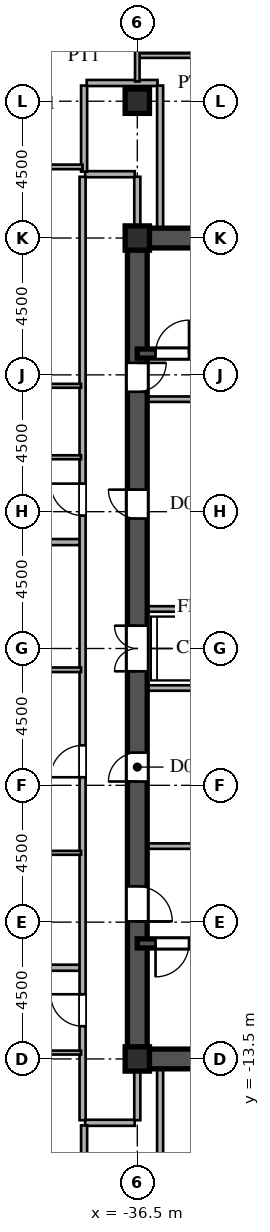
"""IFC4 building model, lengths in metres.
Left out: names, types, materials, properties, quantities, classifications, styles, units other than length and angle.
Written with IfcOpenShell. Run it as: python <this file> out.ifc"""

import sys

from ifc_helpers import new_model, si_unit, direction, frame, frame_2d, origin, origin_2d, place, context, subcontext, project, spatial, rectangle, i_section, extrude, source, transform, mapped, element, fill, save


model = new_model("IFC4")
c1 = context("Model", 3, precision=1e-05, world=origin(), true_north=direction((0.0, 1.0)))
c2 = subcontext(c1, "Body", "Model", "MODEL_VIEW")
j1 = project(units=[si_unit("LENGTHUNIT", "METRE"), si_unit("PLANEANGLEUNIT", "RADIAN")], contexts=[c1])
p1 = place(None, origin())
s1 = spatial("IfcSite", under=j1, at=p1, CompositionType="ELEMENT")
p2 = place(p1, origin())
s2 = spatial("IfcBuilding", under=s1, at=p2, CompositionType="ELEMENT")
p3 = place(p2, frame((0.0, 0.0, 106.8)))
s3 = spatial("IfcBuildingStorey", under=s2, at=p3, CompositionType="ELEMENT", Elevation=106.8)
m1 = source(origin(), c2, "Body", "SweptSolid", [
    extrude(i_section(OverallWidth=0.8, OverallDepth=0.8, WebThickness=0.032, FlangeThickness=0.05, at=origin_2d()), origin(), (0.0, 0.0, 1.0), 3.6),
])
for number, where, z_axis, x_axis in (
    (1, (-36.5, -13.5, 0.0), (0.0, 0.0, 1.0), (1.0, 0.0, 0.0)),
    (2, (-36.5, 13.5, 0.0), (0.0, 0.0, 1.0), (1.0, 0.0, 0.0)),
    (3, (-36.5, 18.0, 0.0), (0.0, 0.0, 1.0), (1.0, 0.0, 0.0)),
):
    element("IfcColumn", number, at=place(p3, frame(where, z_axis=z_axis, x_axis=x_axis)), inside=s3, PredefinedType="COLUMN", context=c2, shape_type="MappedRepresentation", body=[
        mapped(m1, transform((0.0, 0.0, 0.0), scale=1.0)),
    ])
for number, where, z_axis, x_axis in (
    (4, (-36.5, -13.5, 0.0), (0.0, 0.0, 1.0), (1.0, 0.0, 0.0)),
    (5, (-36.5, 13.5, 0.0), (0.0, 0.0, 1.0), (1.0, 0.0, 0.0)),
):
    element("IfcWall", number, at=place(p3, frame(where, z_axis=z_axis, x_axis=x_axis)), inside=s3, PredefinedType="SHEAR", context=c2, shape_type="SweptSolid", body=[
        extrude(rectangle(XDim=9.0, YDim=0.65, at=frame_2d((4.5, 0.0))), origin(), (0.0, 0.0, 1.0), 3.38),
    ])
p4 = place(p3, frame((-36.5, -13.65, 0.0), z_axis=(0.0, 0.0, 1.0), x_axis=(0.0, 1.0, 0.0)))
e6 = element("IfcWall", 6, at=p4, inside=s3, PredefinedType="SHEAR", context=c2, shape_type="SweptSolid", body=[
    extrude(rectangle(XDim=7.15, YDim=0.65, at=frame_2d((3.575, 0.0))), origin(), (0.0, 0.0, 1.0), 3.38),
])
p5 = place(p4, frame((4.675, 0.0, 0.0)))
e7 = element("IfcOpeningElement", 7, at=p5, cuts=e6, PredefinedType="OPENING", context=c2, shape_type="SweptSolid", body=[
    extrude(rectangle(XDim=1.15, YDim=2.2, at=frame_2d((0.575, 1.1))), frame((0.0, 0.335, 0.0), z_axis=(0.0, -1.0, 0.0), x_axis=(1.0, 0.0, 0.0)), (0.0, 0.0, 1.0), 0.67),
])
p6 = place(p3, frame((-36.5, -1.3, 0.0), z_axis=(0.0, 0.0, 1.0), x_axis=(0.0, 1.0, 0.0)))
e8 = element("IfcWall", 8, at=p6, inside=s3, PredefinedType="SHEAR", context=c2, shape_type="SweptSolid", body=[
    extrude(rectangle(XDim=2.6, YDim=0.65, at=frame_2d((1.3, 0.0))), origin(), (0.0, 0.0, 1.0), 3.38),
])
p7 = place(p6, frame((0.55, 0.0, 0.0)))
e9 = element("IfcOpeningElement", 9, at=p7, cuts=e8, PredefinedType="OPENING", context=c2, shape_type="SweptSolid", body=[
    extrude(rectangle(XDim=1.5, YDim=2.3, at=frame_2d((0.75, 1.15))), frame((0.0, 0.335, 0.0), z_axis=(0.0, -1.0, 0.0), x_axis=(1.0, 0.0, 0.0)), (0.0, 0.0, 1.0), 0.67),
])
p8 = place(p3, frame((-36.5, 8.2, 0.0), z_axis=(0.0, 0.0, 1.0), x_axis=(0.0, 1.0, 0.0)))
e10 = element("IfcWall", 10, at=p8, inside=s3, PredefinedType="SHEAR", context=c2, shape_type="SweptSolid", body=[
    extrude(rectangle(XDim=5.45, YDim=0.65, at=frame_2d((2.725, 0.0))), origin(), (0.0, 0.0, 1.0), 3.38),
])
p9 = place(p8, frame((0.245, 0.0, 0.0)))
e11 = element("IfcOpeningElement", 11, at=p9, cuts=e10, PredefinedType="OPENING", context=c2, shape_type="SweptSolid", body=[
    extrude(rectangle(XDim=0.95, YDim=2.15, at=frame_2d((0.475, 1.075))), frame((0.0, 0.335, 0.0), z_axis=(0.0, -1.0, 0.0), x_axis=(1.0, 0.0, 0.0)), (0.0, 0.0, 1.0), 0.67),
])
p10 = place(p3, frame((-36.5, -6.5, 0.0), z_axis=(0.0, 0.0, 1.0), x_axis=(0.0, 1.0, 0.0)))
e12 = element("IfcWall", 12, at=p10, inside=s3, PredefinedType="SHEAR", context=c2, shape_type="SweptSolid", body=[
    extrude(rectangle(XDim=5.2, YDim=0.65, at=frame_2d((2.6, 0.0))), origin(), (0.0, 0.0, 1.0), 3.38),
])
p11 = place(p10, frame((2.125, 0.0, 0.0)))
e13 = element("IfcOpeningElement", 13, at=p11, cuts=e12, PredefinedType="OPENING", context=c2, shape_type="SweptSolid", body=[
    extrude(rectangle(XDim=0.95, YDim=2.15, at=frame_2d((0.475, 1.075))), frame((0.0, 0.335, 0.0), z_axis=(0.0, -1.0, 0.0), x_axis=(1.0, 0.0, 0.0)), (0.0, 0.0, 1.0), 0.67),
])
p12 = place(p3, frame((-36.5, 1.3, 0.0), z_axis=(0.0, 0.0, 1.0), x_axis=(0.0, 1.0, 0.0)))
e14 = element("IfcWall", 14, at=p12, inside=s3, PredefinedType="SHEAR", context=c2, shape_type="SweptSolid", body=[
    extrude(rectangle(XDim=6.9, YDim=0.65, at=frame_2d((3.45, 0.0))), origin(), (0.0, 0.0, 1.0), 3.38),
])
p13 = place(p12, frame((2.975, 0.0, 0.0)))
e15 = element("IfcOpeningElement", 15, at=p13, cuts=e14, PredefinedType="OPENING", context=c2, shape_type="SweptSolid", body=[
    extrude(rectangle(XDim=0.95, YDim=2.15, at=frame_2d((0.475, 1.075))), frame((0.0, 0.335, 0.0), z_axis=(0.0, -1.0, 0.0), x_axis=(1.0, 0.0, 0.0)), (0.0, 0.0, 1.0), 0.67),
])
p14 = place(p3, frame((-36.5, -9.7, 0.0), z_axis=(0.0, 0.0, 1.0), x_axis=(1.0, 0.0, 0.0)))
e16 = element("IfcWall", 16, at=p14, inside=s3, PredefinedType="SHEAR", context=c2, shape_type="SweptSolid", body=[
    extrude(rectangle(XDim=9.0, YDim=0.3, at=frame_2d((4.5, 0.0))), origin(), (0.0, 0.0, 1.0), 3.38),
])
p15 = place(p14, frame((0.6, 0.0, 0.0)))
e17 = element("IfcOpeningElement", 17, at=p15, cuts=e16, PredefinedType="OPENING", context=c2, shape_type="SweptSolid", body=[
    extrude(rectangle(XDim=1.1, YDim=2.2, at=frame_2d((0.55, 1.1))), frame((0.0, 0.16, 0.0), z_axis=(0.0, -1.0, 0.0), x_axis=(1.0, 0.0, 0.0)), (0.0, 0.0, 1.0), 0.32),
])
p16 = place(p3, frame((-36.5, 9.7, 0.0), z_axis=(0.0, 0.0, 1.0), x_axis=(1.0, 0.0, 0.0)))
e18 = element("IfcWall", 18, at=p16, inside=s3, PredefinedType="SHEAR", context=c2, shape_type="SweptSolid", body=[
    extrude(rectangle(XDim=9.0, YDim=0.3, at=frame_2d((4.5, 0.0))), origin(), (0.0, 0.0, 1.0), 3.38),
])
p17 = place(p16, frame((0.6, 0.0, 0.0)))
e19 = element("IfcOpeningElement", 19, at=p17, cuts=e18, PredefinedType="OPENING", context=c2, shape_type="SweptSolid", body=[
    extrude(rectangle(XDim=1.1, YDim=2.2, at=frame_2d((0.55, 1.1))), frame((0.0, 0.16, 0.0), z_axis=(0.0, -1.0, 0.0), x_axis=(1.0, 0.0, 0.0)), (0.0, 0.0, 1.0), 0.32),
])
for number, where, z_axis, x_axis in (
    (20, (-36.15, -6.5, 0.0), (0.0, 0.0, 1.0), (1.0, 0.0, 0.0)),
    (21, (-36.15, 8.2, 0.0), (0.0, 0.0, 1.0), (1.0, 0.0, 0.0)),
):
    element("IfcWall", number, at=place(p3, frame(where, z_axis=z_axis, x_axis=x_axis)), inside=s3, PredefinedType="PARTITIONING", context=c2, shape_type="SweptSolid", body=[
        extrude(rectangle(XDim=5.7, YDim=0.18, at=frame_2d((2.85, 0.0))), origin(), (0.0, 0.0, 1.0), 3.38),
    ])
for number, where, z_axis, x_axis in (
    (22, (-36.15, -1.3, 0.0), (0.0, 0.0, 1.0), (1.0, 0.0, 0.0)),
    (23, (-36.15, 1.3, 0.0), (0.0, 0.0, 1.0), (1.0, 0.0, 0.0)),
):
    element("IfcWall", number, at=place(p3, frame(where, z_axis=z_axis, x_axis=x_axis)), inside=s3, PredefinedType="PARTITIONING", context=c2, shape_type="SweptSolid", body=[
        extrude(rectangle(XDim=2.95, YDim=0.18, at=frame_2d((1.475, 0.0))), origin(), (0.0, 0.0, 1.0), 3.38),
    ])
p18 = place(p3, frame((-38.215, -15.6, 0.0), z_axis=(0.0, 0.0, 1.0), x_axis=(1.0, 0.0, 0.0)))
e24 = element("IfcWall", 24, at=p18, inside=s3, PredefinedType="PARTITIONING", context=c2, shape_type="SweptSolid", body=[
    extrude(rectangle(XDim=1.63, YDim=0.2, at=frame_2d((0.815, 0.0))), origin(), (0.0, 0.0, 1.0), 3.38),
])
p19 = place(p3, frame((-42.5, -13.29, 0.0), z_axis=(0.0, 0.0, 1.0), x_axis=(1.0, 0.0, 0.0)))
e25 = element("IfcWall", 25, at=p19, inside=s3, PredefinedType="PARTITIONING", context=c2, shape_type="SweptSolid", body=[
    extrude(rectangle(XDim=4.15, YDim=0.13, at=frame_2d((2.075, 0.0))), origin(), (0.0, 0.0, 1.0), 3.38),
])
p20 = place(p19, frame((1.635, 0.0, 0.0)))
e26 = element("IfcOpeningElement", 26, at=p20, cuts=e25, PredefinedType="OPENING", context=c2, shape_type="SweptSolid", body=[
    extrude(rectangle(XDim=0.88, YDim=2.1, at=frame_2d((0.44, 1.05))), frame((0.0, 0.075, 0.0), z_axis=(0.0, -1.0, 0.0), x_axis=(1.0, 0.0, 0.0)), (0.0, 0.0, 1.0), 0.15),
])
p21 = place(p3, frame((-64.346, -10.5, 0.0), z_axis=(0.0, 0.0, 1.0), x_axis=(1.0, 0.0, 0.0)))
e27 = element("IfcWall", 27, at=p21, inside=s3, PredefinedType="PARTITIONING", context=c2, shape_type="SweptSolid", body=[
    extrude(rectangle(XDim=25.966, YDim=0.2, at=frame_2d((12.983, 0.0))), origin(), (0.0, 0.0, 1.0), 3.38),
])
p22 = place(p3, frame((-42.5, -6.72, 0.0), z_axis=(0.0, 0.0, 1.0), x_axis=(1.0, 0.0, 0.0)))
e28 = element("IfcWall", 28, at=p22, inside=s3, PredefinedType="PARTITIONING", context=c2, shape_type="SweptSolid", body=[
    extrude(rectangle(XDim=4.15, YDim=0.13, at=frame_2d((2.075, 0.0))), origin(), (0.0, 0.0, 1.0), 3.38),
])
p23 = place(p22, frame((1.635, 0.0, 0.0)))
e29 = element("IfcOpeningElement", 29, at=p23, cuts=e28, PredefinedType="OPENING", context=c2, shape_type="SweptSolid", body=[
    extrude(rectangle(XDim=0.88, YDim=2.1, at=frame_2d((0.44, 1.05))), frame((0.0, 0.075, 0.0), z_axis=(0.0, -1.0, 0.0), x_axis=(1.0, 0.0, 0.0)), (0.0, 0.0, 1.0), 0.15),
])
p24 = place(p3, frame((-42.5, -0.7, 0.0), z_axis=(0.0, 0.0, 1.0), x_axis=(1.0, 0.0, 0.0)))
e30 = element("IfcWall", 30, at=p24, inside=s3, PredefinedType="PARTITIONING", context=c2, shape_type="SweptSolid", body=[
    extrude(rectangle(XDim=4.15, YDim=0.15, at=frame_2d((2.075, 0.0))), origin(), (0.0, 0.0, 1.0), 3.38),
])
p25 = place(p24, frame((1.6, 0.0, 0.0)))
e31 = element("IfcOpeningElement", 31, at=p25, cuts=e30, PredefinedType="OPENING", context=c2, shape_type="SweptSolid", body=[
    extrude(rectangle(XDim=0.95, YDim=2.15, at=frame_2d((0.475, 1.075))), frame((0.0, 0.085, 0.0), z_axis=(0.0, -1.0, 0.0), x_axis=(1.0, 0.0, 0.0)), (0.0, 0.0, 1.0), 0.17),
])
p26 = place(p3, frame((-71.005, 3.5, 0.0), z_axis=(0.0, 0.0, 1.0), x_axis=(1.0, 0.0, 0.0)))
e32 = element("IfcWall", 32, at=p26, inside=s3, PredefinedType="PARTITIONING", context=c2, shape_type="SweptSolid", body=[
    extrude(rectangle(XDim=32.625, YDim=0.2, at=frame_2d((16.312, 0.0))), origin(), (0.0, 0.0, 1.0), 3.38),
])
p27 = place(p3, frame((-42.5, 6.29, 0.0), z_axis=(0.0, 0.0, 1.0), x_axis=(1.0, 0.0, 0.0)))
e33 = element("IfcWall", 33, at=p27, inside=s3, PredefinedType="PARTITIONING", context=c2, shape_type="SweptSolid", body=[
    extrude(rectangle(XDim=4.15, YDim=0.13, at=frame_2d((2.075, 0.0))), origin(), (0.0, 0.0, 1.0), 3.38),
])
p28 = place(p27, frame((1.635, 0.0, 0.0)))
e34 = element("IfcOpeningElement", 34, at=p28, cuts=e33, PredefinedType="OPENING", context=c2, shape_type="SweptSolid", body=[
    extrude(rectangle(XDim=0.88, YDim=2.1, at=frame_2d((0.44, 1.05))), frame((0.0, 0.075, 0.0), z_axis=(0.0, -1.0, 0.0), x_axis=(1.0, 0.0, 0.0)), (0.0, 0.0, 1.0), 0.15),
])
p29 = place(p3, frame((-42.5, 8.64, 0.0), z_axis=(0.0, 0.0, 1.0), x_axis=(1.0, 0.0, 0.0)))
e35 = element("IfcWall", 35, at=p29, inside=s3, PredefinedType="PARTITIONING", context=c2, shape_type="SweptSolid", body=[
    extrude(rectangle(XDim=4.15, YDim=0.13, at=frame_2d((2.075, 0.0))), origin(), (0.0, 0.0, 1.0), 3.38),
])
p30 = place(p3, frame((-38.215, 15.6, 0.0), z_axis=(0.0, 0.0, 1.0), x_axis=(1.0, 0.0, 0.0)))
e36 = element("IfcWall", 36, at=p30, inside=s3, PredefinedType="PARTITIONING", context=c2, shape_type="SweptSolid", body=[
    extrude(rectangle(XDim=1.63, YDim=0.2, at=frame_2d((0.815, 0.0))), origin(), (0.0, 0.0, 1.0), 3.38),
])
p31 = place(p3, frame((-42.5, 15.84, 0.0), z_axis=(0.0, 0.0, 1.0), x_axis=(1.0, 0.0, 0.0)))
e37 = element("IfcWall", 37, at=p31, inside=s3, PredefinedType="PARTITIONING", context=c2, shape_type="SweptSolid", body=[
    extrude(rectangle(XDim=4.2, YDim=0.15, at=frame_2d((2.1, 0.0))), origin(), (0.0, 0.0, 1.0), 3.38),
])
p32 = place(p3, frame((-38.165, 18.6, 0.0), z_axis=(0.0, 0.0, 1.0), x_axis=(1.0, 0.0, 0.0)))
e38 = element("IfcWall", 38, at=p32, inside=s3, PredefinedType="PARTITIONING", context=c2, shape_type="SweptSolid", body=[
    extrude(rectangle(XDim=0.753, YDim=0.2, at=frame_2d((0.376, 0.0))), origin(), (0.0, 0.0, 1.0), 2.08),
])
p33 = place(p3, frame((-37.412, 18.6, 0.0), z_axis=(0.0, 0.0, 1.0), x_axis=(1.0, 0.0, 0.0)))
e39 = element("IfcWall", 39, at=p33, inside=s3, PredefinedType="PARTITIONING", context=c2, shape_type="SweptSolid", body=[
    extrude(rectangle(XDim=1.577, YDim=0.2, at=frame_2d((0.789, 0.0))), origin(), (0.0, 0.0, 1.0), 3.38),
])
p34 = place(p3, frame((-36.45, 19.5, 0.0), z_axis=(0.0, 0.0, 1.0), x_axis=(1.0, 0.0, 0.0)))
e40 = element("IfcWall", 40, at=p34, inside=s3, PredefinedType="PARTITIONING", context=c2, shape_type="SweptSolid", body=[
    extrude(rectangle(XDim=8.985, YDim=0.15, at=frame_2d((4.492, 0.0))), origin(), (0.0, 0.0, 1.0), 3.38),
])
p35 = place(p34, frame((3.975, 0.0, 0.0)))
e41 = element("IfcOpeningElement", 41, at=p35, cuts=e40, PredefinedType="OPENING", context=c2, shape_type="SweptSolid", body=[
    extrude(rectangle(XDim=0.95, YDim=2.15, at=frame_2d((0.475, 1.075))), frame((0.0, 0.085, 0.0), z_axis=(0.0, -1.0, 0.0), x_axis=(1.0, 0.0, 0.0)), (0.0, 0.0, 1.0), 0.17),
])
p36 = place(p3, frame((-38.3, -15.515, 0.0), z_axis=(0.0, 0.0, 1.0), x_axis=(0.0, 1.0, 0.0)))
e42 = element("IfcWall", 42, at=p36, inside=s3, PredefinedType="PARTITIONING", context=c2, shape_type="SweptSolid", body=[
    extrude(rectangle(XDim=31.03, YDim=0.2, at=frame_2d((15.515, 0.0))), origin(), (0.0, 0.0, 1.0), 3.38),
])
p37 = place(p36, frame((3.093, 0.0, 0.0)))
e43 = element("IfcOpeningElement", 43, at=p37, cuts=e42, PredefinedType="OPENING", context=c2, shape_type="SweptSolid", body=[
    extrude(rectangle(XDim=1.05, YDim=2.25, at=frame_2d((0.525, 1.125))), frame((0.0, 0.11, 0.0), z_axis=(0.0, -1.0, 0.0), x_axis=(1.0, 0.0, 0.0)), (0.0, 0.0, 1.0), 0.22),
])
p38 = place(p36, frame((11.28, 0.0, 0.0)))
e44 = element("IfcOpeningElement", 44, at=p38, cuts=e42, PredefinedType="OPENING", context=c2, shape_type="SweptSolid", body=[
    extrude(rectangle(XDim=1.05, YDim=2.25, at=frame_2d((0.525, 1.125))), frame((0.0, 0.11, 0.0), z_axis=(0.0, -1.0, 0.0), x_axis=(1.0, 0.0, 0.0)), (0.0, 0.0, 1.0), 0.22),
])
p39 = place(p36, frame((19.887, 0.0, 0.0)))
e45 = element("IfcOpeningElement", 45, at=p39, cuts=e42, PredefinedType="OPENING", context=c2, shape_type="SweptSolid", body=[
    extrude(rectangle(XDim=1.05, YDim=2.25, at=frame_2d((0.525, 1.125))), frame((0.0, 0.11, 0.0), z_axis=(0.0, -1.0, 0.0), x_axis=(1.0, 0.0, 0.0)), (0.0, 0.0, 1.0), 0.22),
])
for number, where, z_axis, x_axis in (
    (46, (-38.25, -18.515, 0.0), (0.0, 0.0, 1.0), (0.0, 1.0, 0.0)),
    (47, (-38.25, 15.685, 0.0), (0.0, 0.0, 1.0), (0.0, 1.0, 0.0)),
):
    element("IfcWall", number, at=place(p3, frame(where, z_axis=z_axis, x_axis=x_axis)), inside=s3, PredefinedType="PARTITIONING", context=c2, shape_type="SweptSolid", body=[
        extrude(rectangle(XDim=2.83, YDim=0.2, at=frame_2d((1.415, 0.0))), origin(), (0.0, 0.0, 1.0), 3.38),
    ])
for number, where, z_axis, x_axis in (
    (48, (-36.5, -15.515, 0.0), (0.0, 0.0, 1.0), (0.0, 1.0, 0.0)),
    (49, (-36.5, 13.83, 0.0), (0.0, 0.0, 1.0), (0.0, 1.0, 0.0)),
):
    element("IfcWall", number, at=place(p3, frame(where, z_axis=z_axis, x_axis=x_axis)), inside=s3, PredefinedType="PARTITIONING", context=c2, shape_type="SweptSolid", body=[
        extrude(rectangle(XDim=1.685, YDim=0.2, at=frame_2d((0.842, 0.0))), origin(), (0.0, 0.0, 1.0), 1.38),
    ])
p40 = place(p3, frame((-36.5, 18.65, 0.0), z_axis=(0.0, 0.0, 1.0), x_axis=(0.0, 1.0, 0.0)))
e50 = element("IfcWall", 50, at=p40, inside=s3, PredefinedType="PARTITIONING", context=c2, shape_type="SweptSolid", body=[
    extrude(rectangle(XDim=4.41, YDim=0.15, at=frame_2d((2.205, 0.0))), origin(), (0.0, 0.0, 1.0), 3.38),
])
p41 = place(p40, frame((2.137, 0.0, 0.0)))
e51 = element("IfcOpeningElement", 51, at=p41, cuts=e50, PredefinedType="OPENING", context=c2, shape_type="SweptSolid", body=[
    extrude(rectangle(XDim=0.95, YDim=2.15, at=frame_2d((0.475, 1.075))), frame((0.0, 0.085, 0.0), z_axis=(0.0, -1.0, 0.0), x_axis=(1.0, 0.0, 0.0)), (0.0, 0.0, 1.0), 0.17),
])
for number, where, z_axis, x_axis in (
    (52, (-35.75, -18.515, 0.0), (0.0, 0.0, 1.0), (0.0, 1.0, 0.0)),
    (53, (-35.75, 13.83, 0.0), (0.0, 0.0, 1.0), (0.0, 1.0, 0.0)),
):
    element("IfcWall", number, at=place(p3, frame(where, z_axis=z_axis, x_axis=x_axis)), inside=s3, PredefinedType="PARTITIONING", context=c2, shape_type="SweptSolid", body=[
        extrude(rectangle(XDim=4.685, YDim=0.2, at=frame_2d((2.342, 0.0))), origin(), (0.0, 0.0, 1.0), 3.38),
    ])
m2 = source(origin(), c2, "Body", "SweptSolid", [
    extrude(rectangle(XDim=1.15, YDim=2.2, at=frame_2d((0.575, 1.1))), frame((0.0, 0.025, 0.0), z_axis=(0.0, -1.0, 0.0), x_axis=(1.0, 0.0, 0.0)), (0.0, 0.0, 1.0), 0.05),
])
p42 = place(p5, frame((1.15, 0.0, 0.0), z_axis=(0.0, 0.0, 1.0), x_axis=(-1.0, 0.0, 0.0)))
e54 = element("IfcDoor", 54, at=p42, inside=s3, OperationType="SINGLE_SWING_LEFT", PredefinedType="DOOR", context=c2, shape_type="MappedRepresentation", body=[
    mapped(m2, transform((0.0, 0.0, 0.0), scale=1.0)),
])
fill(e7, e54)
m3 = source(origin(), c2, "Body", "SweptSolid", [
    extrude(rectangle(XDim=1.5, YDim=2.3, at=frame_2d((0.75, 1.15))), frame((0.0, 0.025, 0.0), z_axis=(0.0, -1.0, 0.0), x_axis=(1.0, 0.0, 0.0)), (0.0, 0.0, 1.0), 0.05),
])
p43 = place(p7, origin())
e55 = element("IfcDoor", 55, at=p43, inside=s3, OperationType="DOUBLE_SWING_LEFT", PredefinedType="DOOR", context=c2, shape_type="MappedRepresentation", body=[
    mapped(m3, transform((0.0, 0.0, 0.0), scale=1.0)),
])
fill(e9, e55)
m4 = source(origin(), c2, "Body", "SweptSolid", [
    extrude(rectangle(XDim=0.95, YDim=2.15, at=frame_2d((0.475, 1.075))), frame((0.0, 0.025, 0.0), z_axis=(0.0, -1.0, 0.0), x_axis=(1.0, 0.0, 0.0)), (0.0, 0.0, 1.0), 0.05),
])
p44 = place(p9, frame((0.95, 0.0, 0.0), z_axis=(0.0, 0.0, 1.0), x_axis=(-1.0, 0.0, 0.0)))
e56 = element("IfcDoor", 56, at=p44, inside=s3, OperationType="SINGLE_SWING_RIGHT", PredefinedType="DOOR", context=c2, shape_type="MappedRepresentation", body=[
    mapped(m4, transform((0.0, 0.0, 0.0), scale=1.0)),
])
fill(e11, e56)
p45 = place(p11, origin())
e57 = element("IfcDoor", 57, at=p45, inside=s3, OperationType="SINGLE_SWING_LEFT", PredefinedType="DOOR", context=c2, shape_type="MappedRepresentation", body=[
    mapped(m4, transform((0.0, 0.0, 0.0), scale=1.0)),
])
fill(e13, e57)
p46 = place(p13, origin())
e58 = element("IfcDoor", 58, at=p46, inside=s3, OperationType="SINGLE_SWING_RIGHT", PredefinedType="DOOR", context=c2, shape_type="MappedRepresentation", body=[
    mapped(m4, transform((0.0, 0.0, 0.0), scale=1.0)),
])
fill(e15, e58)
m5 = source(origin(), c2, "Body", "SweptSolid", [
    extrude(rectangle(XDim=1.1, YDim=2.2, at=frame_2d((0.55, 1.1))), frame((0.0, 0.025, 0.0), z_axis=(0.0, -1.0, 0.0), x_axis=(1.0, 0.0, 0.0)), (0.0, 0.0, 1.0), 0.05),
])
p47 = place(p15, frame((1.1, 0.0, 0.0), z_axis=(0.0, 0.0, 1.0), x_axis=(-1.0, 0.0, 0.0)))
e59 = element("IfcDoor", 59, at=p47, inside=s3, OperationType="SINGLE_SWING_LEFT", PredefinedType="DOOR", context=c2, shape_type="MappedRepresentation", body=[
    mapped(m5, transform((0.0, 0.0, 0.0), scale=1.0)),
])
fill(e17, e59)
p48 = place(p17, origin())
e60 = element("IfcDoor", 60, at=p48, inside=s3, OperationType="SINGLE_SWING_RIGHT", PredefinedType="DOOR", context=c2, shape_type="MappedRepresentation", body=[
    mapped(m5, transform((0.0, 0.0, 0.0), scale=1.0)),
])
fill(e19, e60)
m6 = source(origin(), c2, "Body", "SweptSolid", [
    extrude(rectangle(XDim=1.05, YDim=2.25, at=frame_2d((0.525, 1.125))), frame((0.0, 0.025, 0.0), z_axis=(0.0, -1.0, 0.0), x_axis=(1.0, 0.0, 0.0)), (0.0, 0.0, 1.0), 0.05),
])
p49 = place(p37, origin())
e61 = element("IfcDoor", 61, at=p49, inside=s3, OperationType="SINGLE_SWING_RIGHT", PredefinedType="DOOR", context=c2, shape_type="MappedRepresentation", body=[
    mapped(m6, transform((0.0, 0.0, 0.0), scale=1.0)),
])
fill(e43, e61)
p50 = place(p38, origin())
e62 = element("IfcDoor", 62, at=p50, inside=s3, OperationType="SINGLE_SWING_LEFT", PredefinedType="DOOR", context=c2, shape_type="MappedRepresentation", body=[
    mapped(m6, transform((0.0, 0.0, 0.0), scale=1.0)),
])
fill(e44, e62)
p51 = place(p39, origin())
e63 = element("IfcDoor", 63, at=p51, inside=s3, OperationType="SINGLE_SWING_RIGHT", PredefinedType="DOOR", context=c2, shape_type="MappedRepresentation", body=[
    mapped(m6, transform((0.0, 0.0, 0.0), scale=1.0)),
])
fill(e45, e63)
save(model, sys.argv[1])
